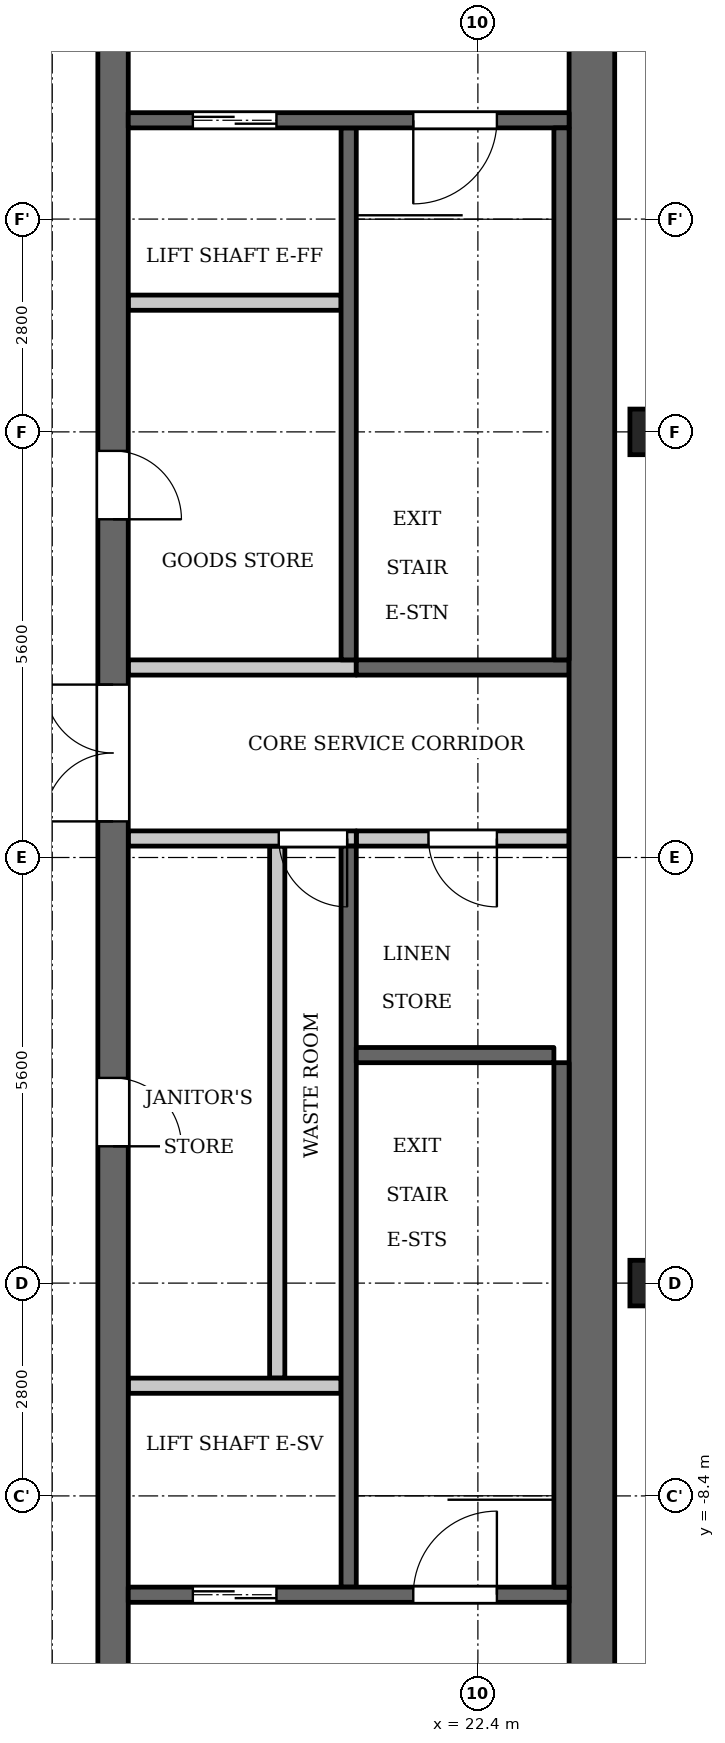
"""IFC4 building model, lengths in metres.
Left out: names, types, materials, properties, quantities, classifications, styles, units other than length and angle.
Written with IfcOpenShell. Run it as: python <this file> out.ifc"""

import sys

from ifc_helpers import new_model, si_unit, direction, frame, frame_2d, origin, origin_2d, place, context, subcontext, project, spatial, polyline, rectangle, outline, extrude, element, fill, save


model = new_model("IFC4")
c1 = context("Model", 3, precision=1e-05, world=origin(), true_north=direction((0.0, 1.0)))
c2 = subcontext(c1, "Body", "Model", "MODEL_VIEW")
j1 = project(units=[si_unit("LENGTHUNIT", "METRE"), si_unit("PLANEANGLEUNIT", "RADIAN")], contexts=[c1])
p1 = place(None, origin())
s1 = spatial("IfcSite", under=j1, at=p1, CompositionType="ELEMENT")
p2 = place(p1, origin())
s2 = spatial("IfcBuilding", under=s1, at=p2, CompositionType="ELEMENT")
p3 = place(p2, frame((0.0, 0.0, 313.9)))
s3 = spatial("IfcBuildingStorey", under=s2, at=p3, CompositionType="ELEMENT", Elevation=313.9)
for number, where, z_axis, x_axis in (
    (1, (24.7, -5.6, 0.0), (0.0, 0.0, 1.0), (1.0, 0.0, 0.0)),
    (2, (24.7, 5.6, 0.0), (0.0, 0.0, 1.0), (1.0, 0.0, 0.0)),
):
    element("IfcColumn", number, at=place(p3, frame(where, z_axis=z_axis, x_axis=x_axis)), inside=s3, PredefinedType="COLUMN", context=c2, shape_type="SweptSolid", body=[
        extrude(rectangle(XDim=0.6, YDim=0.6, at=origin_2d()), origin(), (0.0, 0.0, 1.0), 3.5),
    ])
p4 = place(p3, frame((0.0, 0.0, 3.5)))
e3 = element("IfcWall", 3, at=p4, inside=s3, PredefinedType="PARAPET", context=c2, shape_type="SweptSolid", body=[
    extrude(outline(polyline([(15.0, 19.6), (15.0, -19.6), (17.2, -19.6), (19.424, -19.176), (21.297, -17.903), (23.503, -15.697), (24.776, -13.824), (25.2, -11.6), (25.2, 11.6), (24.776, 13.824), (23.503, 15.697), (21.297, 17.903), (19.424, 19.176), (17.2, 19.6), (15.0, 19.6)]), holes=[polyline([(17.172, -19.3), (15.3, -19.3), (15.3, 19.3), (17.172, 19.3), (19.307, 18.893), (21.105, 17.671), (23.271, 15.505), (24.493, 13.707), (24.9, 11.572), (24.9, -11.572), (24.493, -13.707), (23.271, -15.505), (21.105, -17.671), (19.307, -18.893), (17.172, -19.3)])]), origin(), (0.0, 0.0, 1.0), 1.5),
])
p5 = place(p3, frame((20.7, 2.6, 0.0), z_axis=(0.0, 0.0, 1.0), x_axis=(0.0, 1.0, 0.0)))
e4 = element("IfcWall", 4, at=p5, inside=s3, PredefinedType="SHEAR", context=c2, shape_type="SweptSolid", body=[
    extrude(rectangle(XDim=7.0, YDim=0.2, at=frame_2d((3.5, 0.0))), origin(), (0.0, 0.0, 1.0), 3.2),
])
p6 = place(p3, frame((20.7, -9.6, 0.0), z_axis=(0.0, 0.0, 1.0), x_axis=(0.0, 1.0, 0.0)))
e5 = element("IfcWall", 5, at=p6, inside=s3, PredefinedType="SHEAR", context=c2, shape_type="SweptSolid", body=[
    extrude(rectangle(XDim=9.75, YDim=0.2, at=frame_2d((4.875, 0.0))), origin(), (0.0, 0.0, 1.0), 3.2),
])
p7 = place(p3, frame((20.8, 2.5, 0.0), z_axis=(0.0, 0.0, 1.0), x_axis=(1.0, 0.0, 0.0)))
e6 = element("IfcWall", 6, at=p7, inside=s3, PredefinedType="SHEAR", context=c2, shape_type="SweptSolid", body=[
    extrude(rectangle(XDim=2.8, YDim=0.2, at=frame_2d((1.4, 0.0))), origin(), (0.0, 0.0, 1.0), 3.2),
])
p8 = place(p3, frame((20.8, 0.25, 0.0), z_axis=(0.0, 0.0, 1.0), x_axis=(1.0, 0.0, 0.0)))
e7 = element("IfcWall", 7, at=p8, inside=s3, PredefinedType="PARTITIONING", context=c2, shape_type="SweptSolid", body=[
    extrude(rectangle(XDim=2.8, YDim=0.2, at=frame_2d((1.4, 0.0))), origin(), (0.0, 0.0, 1.0), 3.2),
])
p9 = place(p8, frame((0.95, 0.0, 0.0)))
e8 = element("IfcOpeningElement", 8, at=p9, cuts=e7, PredefinedType="OPENING", context=c2, shape_type="SweptSolid", body=[
    extrude(rectangle(XDim=0.9, YDim=2.1, at=frame_2d((0.45, 1.05))), frame((0.0, 0.11, 0.0), z_axis=(0.0, -1.0, 0.0), x_axis=(1.0, 0.0, 0.0)), (0.0, 0.0, 1.0), 0.22),
])
p10 = place(p3, frame((19.76, -6.85, 0.0), z_axis=(0.0, 0.0, 1.0), x_axis=(0.0, 1.0, 0.0)))
e9 = element("IfcWall", 9, at=p10, inside=s3, PredefinedType="PARTITIONING", context=c2, shape_type="SweptSolid", body=[
    extrude(rectangle(XDim=7.0, YDim=0.2, at=frame_2d((3.5, 0.0))), origin(), (0.0, 0.0, 1.0), 3.2),
])
p11 = place(p3, frame((17.6, -12.6, 0.0), z_axis=(0.0, 0.0, 1.0), x_axis=(0.0, 1.0, 0.0)))
e10 = element("IfcWall", 10, at=p11, inside=s3, PredefinedType="SHEAR", context=c2, shape_type="SweptSolid", body=[
    extrude(rectangle(XDim=25.2, YDim=0.4, at=frame_2d((12.6, 0.0))), origin(), (0.0, 0.0, 1.0), 3.2),
])
p12 = place(p11, frame((8.8, 0.0, 0.0)))
e11 = element("IfcOpeningElement", 11, at=p12, cuts=e10, PredefinedType="OPENING", context=c2, shape_type="SweptSolid", body=[
    extrude(rectangle(XDim=0.9, YDim=2.1, at=frame_2d((0.45, 1.05))), frame((0.0, 0.21, 0.0), z_axis=(0.0, -1.0, 0.0), x_axis=(1.0, 0.0, 0.0)), (0.0, 0.0, 1.0), 0.42),
])
p13 = place(p11, frame((17.05, 0.0, 0.0)))
e12 = element("IfcOpeningElement", 12, at=p13, cuts=e10, PredefinedType="OPENING", context=c2, shape_type="SweptSolid", body=[
    extrude(rectangle(XDim=0.9, YDim=2.1, at=frame_2d((0.45, 1.05))), frame((0.0, 0.21, 0.0), z_axis=(0.0, -1.0, 0.0), x_axis=(1.0, 0.0, 0.0)), (0.0, 0.0, 1.0), 0.42),
])
p14 = place(p11, frame((23.25, 0.0, 0.0)))
e13 = element("IfcOpeningElement", 13, at=p14, cuts=e10, PredefinedType="OPENING", context=c2, shape_type="SweptSolid", body=[
    extrude(rectangle(XDim=1.1, YDim=2.1, at=frame_2d((0.55, 1.05))), frame((0.0, 0.21, 0.0), z_axis=(0.0, -1.0, 0.0), x_axis=(1.0, 0.0, 0.0)), (0.0, 0.0, 1.0), 0.42),
])
p15 = place(p11, frame((0.85, 0.0, 0.0)))
e14 = element("IfcOpeningElement", 14, at=p15, cuts=e10, PredefinedType="OPENING", context=c2, shape_type="SweptSolid", body=[
    extrude(rectangle(XDim=1.1, YDim=2.1, at=frame_2d((0.55, 1.05))), frame((0.0, 0.21, 0.0), z_axis=(0.0, -1.0, 0.0), x_axis=(1.0, 0.0, 0.0)), (0.0, 0.0, 1.0), 0.42),
])
p16 = place(p11, frame((13.075, 0.0, 0.0)))
e15 = element("IfcOpeningElement", 15, at=p16, cuts=e10, PredefinedType="OPENING", context=c2, shape_type="SweptSolid", body=[
    extrude(rectangle(XDim=1.8, YDim=2.1, at=frame_2d((0.9, 1.05))), frame((0.0, 0.21, 0.0), z_axis=(0.0, -1.0, 0.0), x_axis=(1.0, 0.0, 0.0)), (0.0, 0.0, 1.0), 0.42),
])
p17 = place(p3, frame((23.9, -12.6, 0.0), z_axis=(0.0, 0.0, 1.0), x_axis=(0.0, 1.0, 0.0)))
e16 = element("IfcWall", 16, at=p17, inside=s3, PredefinedType="SHEAR", context=c2, shape_type="SweptSolid", body=[
    extrude(rectangle(XDim=25.2, YDim=0.6, at=frame_2d((12.6, 0.0))), origin(), (0.0, 0.0, 1.0), 3.2),
])
p18 = place(p3, frame((17.8, -9.7, 0.0), z_axis=(0.0, 0.0, 1.0), x_axis=(1.0, 0.0, 0.0)))
e17 = element("IfcWall", 17, at=p18, inside=s3, PredefinedType="SHEAR", context=c2, shape_type="SweptSolid", body=[
    extrude(rectangle(XDim=5.8, YDim=0.2, at=frame_2d((2.9, 0.0))), origin(), (0.0, 0.0, 1.0), 3.2),
])
p19 = place(p18, frame((0.85, 0.0, 0.0)))
e18 = element("IfcOpeningElement", 18, at=p19, cuts=e17, PredefinedType="OPENING", context=c2, shape_type="SweptSolid", body=[
    extrude(rectangle(XDim=1.1, YDim=2.1, at=frame_2d((0.55, 1.05))), frame((0.0, 0.11, 0.0), z_axis=(0.0, -1.0, 0.0), x_axis=(1.0, 0.0, 0.0)), (0.0, 0.0, 1.0), 0.22),
])
p20 = place(p18, frame((3.75, 0.0, 0.0)))
e19 = element("IfcOpeningElement", 19, at=p20, cuts=e17, PredefinedType="OPENING", context=c2, shape_type="SweptSolid", body=[
    extrude(rectangle(XDim=1.1, YDim=2.1, at=frame_2d((0.55, 1.05))), frame((0.0, 0.11, 0.0), z_axis=(0.0, -1.0, 0.0), x_axis=(1.0, 0.0, 0.0)), (0.0, 0.0, 1.0), 0.22),
])
p21 = place(p3, frame((17.8, -6.95, 0.0), z_axis=(0.0, 0.0, 1.0), x_axis=(1.0, 0.0, 0.0)))
e20 = element("IfcWall", 20, at=p21, inside=s3, PredefinedType="PARTITIONING", context=c2, shape_type="SweptSolid", body=[
    extrude(rectangle(XDim=2.8, YDim=0.2, at=frame_2d((1.4, 0.0))), origin(), (0.0, 0.0, 1.0), 3.2),
])
p22 = place(p3, frame((17.8, 0.25, 0.0), z_axis=(0.0, 0.0, 1.0), x_axis=(1.0, 0.0, 0.0)))
e21 = element("IfcWall", 21, at=p22, inside=s3, PredefinedType="PARTITIONING", context=c2, shape_type="SweptSolid", body=[
    extrude(rectangle(XDim=3.0, YDim=0.2, at=frame_2d((1.5, 0.0))), origin(), (0.0, 0.0, 1.0), 3.2),
])
p23 = place(p22, frame((1.98, 0.0, 0.0)))
e22 = element("IfcOpeningElement", 22, at=p23, cuts=e21, PredefinedType="OPENING", context=c2, shape_type="SweptSolid", body=[
    extrude(rectangle(XDim=0.9, YDim=2.1, at=frame_2d((0.45, 1.05))), frame((0.0, 0.11, 0.0), z_axis=(0.0, -1.0, 0.0), x_axis=(1.0, 0.0, 0.0)), (0.0, 0.0, 1.0), 0.22),
])
p24 = place(p3, frame((17.8, 2.5, 0.0), z_axis=(0.0, 0.0, 1.0), x_axis=(1.0, 0.0, 0.0)))
e23 = element("IfcWall", 23, at=p24, inside=s3, PredefinedType="PARTITIONING", context=c2, shape_type="SweptSolid", body=[
    extrude(rectangle(XDim=3.0, YDim=0.2, at=frame_2d((1.5, 0.0))), origin(), (0.0, 0.0, 1.0), 3.2),
])
p25 = place(p3, frame((17.8, 7.3, 0.0), z_axis=(0.0, 0.0, 1.0), x_axis=(1.0, 0.0, 0.0)))
e24 = element("IfcWall", 24, at=p25, inside=s3, PredefinedType="PARTITIONING", context=c2, shape_type="SweptSolid", body=[
    extrude(rectangle(XDim=2.8, YDim=0.2, at=frame_2d((1.4, 0.0))), origin(), (0.0, 0.0, 1.0), 3.2),
])
p26 = place(p3, frame((17.8, 9.7, 0.0), z_axis=(0.0, 0.0, 1.0), x_axis=(1.0, 0.0, 0.0)))
e25 = element("IfcWall", 25, at=p26, inside=s3, PredefinedType="SHEAR", context=c2, shape_type="SweptSolid", body=[
    extrude(rectangle(XDim=5.8, YDim=0.2, at=frame_2d((2.9, 0.0))), origin(), (0.0, 0.0, 1.0), 3.2),
])
p27 = place(p26, frame((0.85, 0.0, 0.0)))
e26 = element("IfcOpeningElement", 26, at=p27, cuts=e25, PredefinedType="OPENING", context=c2, shape_type="SweptSolid", body=[
    extrude(rectangle(XDim=1.1, YDim=2.1, at=frame_2d((0.55, 1.05))), frame((0.0, 0.11, 0.0), z_axis=(0.0, -1.0, 0.0), x_axis=(1.0, 0.0, 0.0)), (0.0, 0.0, 1.0), 0.22),
])
p28 = place(p26, frame((3.75, 0.0, 0.0)))
e27 = element("IfcOpeningElement", 27, at=p28, cuts=e25, PredefinedType="OPENING", context=c2, shape_type="SweptSolid", body=[
    extrude(rectangle(XDim=1.1, YDim=2.1, at=frame_2d((0.55, 1.05))), frame((0.0, 0.11, 0.0), z_axis=(0.0, -1.0, 0.0), x_axis=(1.0, 0.0, 0.0)), (0.0, 0.0, 1.0), 0.22),
])
p29 = place(p3, frame((23.5, 2.6, 0.0), z_axis=(0.0, 0.0, 1.0), x_axis=(0.0, 1.0, 0.0)))
e28 = element("IfcWall", 28, at=p29, inside=s3, PredefinedType="SHEAR", context=c2, shape_type="SweptSolid", body=[
    extrude(rectangle(XDim=7.0, YDim=0.2, at=frame_2d((3.5, 0.0))), origin(), (0.0, 0.0, 1.0), 3.2),
])
p30 = place(p3, frame((23.5, -9.6, 0.0), z_axis=(0.0, 0.0, 1.0), x_axis=(0.0, 1.0, 0.0)))
e29 = element("IfcWall", 29, at=p30, inside=s3, PredefinedType="SHEAR", context=c2, shape_type="SweptSolid", body=[
    extrude(rectangle(XDim=6.9, YDim=0.2, at=frame_2d((3.45, 0.0))), origin(), (0.0, 0.0, 1.0), 3.2),
])
p31 = place(p3, frame((20.8, -2.6, 0.0), z_axis=(0.0, 0.0, 1.0), x_axis=(1.0, 0.0, 0.0)))
e30 = element("IfcWall", 30, at=p31, inside=s3, PredefinedType="SHEAR", context=c2, shape_type="SweptSolid", body=[
    extrude(rectangle(XDim=2.6, YDim=0.2, at=frame_2d((1.3, 0.0))), origin(), (0.0, 0.0, 1.0), 3.2),
])
p32 = place(p19, origin())
e31 = element("IfcDoor", 31, at=p32, inside=s3, OperationType="DOUBLE_DOOR_SLIDING", PredefinedType="DOOR", context=c2, shape_type="SweptSolid", body=[
    extrude(rectangle(XDim=1.1, YDim=2.1, at=frame_2d((0.55, 1.05))), frame((0.0, 0.025, 0.0), z_axis=(0.0, -1.0, 0.0), x_axis=(1.0, 0.0, 0.0)), (0.0, 0.0, 1.0), 0.05),
])
fill(e18, e31)
p33 = place(p12, origin())
e32 = element("IfcDoor", 32, at=p33, inside=s3, OperationType="SINGLE_SWING_LEFT", PredefinedType="DOOR", context=c2, shape_type="SweptSolid", body=[
    extrude(rectangle(XDim=0.9, YDim=2.1, at=frame_2d((0.45, 1.05))), frame((0.0, 0.025, 0.0), z_axis=(0.0, -1.0, 0.0), x_axis=(1.0, 0.0, 0.0)), (0.0, 0.0, 1.0), 0.05),
])
fill(e11, e32)
p34 = place(p23, origin())
e33 = element("IfcDoor", 33, at=p34, inside=s3, OperationType="SINGLE_SWING_RIGHT", PredefinedType="DOOR", context=c2, shape_type="SweptSolid", body=[
    extrude(rectangle(XDim=0.9, YDim=2.1, at=frame_2d((0.45, 1.05))), frame((0.0, 0.025, 0.0), z_axis=(0.0, -1.0, 0.0), x_axis=(1.0, 0.0, 0.0)), (0.0, 0.0, 1.0), 0.05),
])
fill(e22, e33)
p35 = place(p13, origin())
e34 = element("IfcDoor", 34, at=p35, inside=s3, OperationType="SINGLE_SWING_LEFT", PredefinedType="DOOR", context=c2, shape_type="SweptSolid", body=[
    extrude(rectangle(XDim=0.9, YDim=2.1, at=frame_2d((0.45, 1.05))), frame((0.0, 0.025, 0.0), z_axis=(0.0, -1.0, 0.0), x_axis=(1.0, 0.0, 0.0)), (0.0, 0.0, 1.0), 0.05),
])
fill(e12, e34)
p36 = place(p27, origin())
e35 = element("IfcDoor", 35, at=p36, inside=s3, OperationType="DOUBLE_DOOR_SLIDING", PredefinedType="DOOR", context=c2, shape_type="SweptSolid", body=[
    extrude(rectangle(XDim=1.1, YDim=2.1, at=frame_2d((0.55, 1.05))), frame((0.0, 0.025, 0.0), z_axis=(0.0, -1.0, 0.0), x_axis=(1.0, 0.0, 0.0)), (0.0, 0.0, 1.0), 0.05),
])
fill(e26, e35)
p37 = place(p28, origin())
e36 = element("IfcDoor", 36, at=p37, inside=s3, OperationType="SINGLE_SWING_LEFT", PredefinedType="DOOR", context=c2, shape_type="SweptSolid", body=[
    extrude(rectangle(XDim=1.1, YDim=2.1, at=frame_2d((0.55, 1.05))), frame((0.0, 0.025, 0.0), z_axis=(0.0, -1.0, 0.0), x_axis=(1.0, 0.0, 0.0)), (0.0, 0.0, 1.0), 0.05),
])
fill(e27, e36)
p38 = place(p20, origin())
e37 = element("IfcDoor", 37, at=p38, inside=s3, OperationType="SINGLE_SWING_LEFT", PredefinedType="DOOR", context=c2, shape_type="SweptSolid", body=[
    extrude(rectangle(XDim=1.1, YDim=2.1, at=frame_2d((0.55, 1.05))), frame((0.0, 0.025, 0.0), z_axis=(0.0, -1.0, 0.0), x_axis=(1.0, 0.0, 0.0)), (0.0, 0.0, 1.0), 0.05),
])
fill(e19, e37)
p39 = place(p16, origin())
e38 = element("IfcDoor", 38, at=p39, inside=s3, OperationType="DOUBLE_DOOR_SINGLE_SWING", PredefinedType="DOOR", context=c2, shape_type="SweptSolid", body=[
    extrude(rectangle(XDim=1.8, YDim=2.1, at=frame_2d((0.9, 1.05))), frame((0.0, 0.025, 0.0), z_axis=(0.0, -1.0, 0.0), x_axis=(1.0, 0.0, 0.0)), (0.0, 0.0, 1.0), 0.05),
])
fill(e15, e38)
p40 = place(p9, origin())
e39 = element("IfcDoor", 39, at=p40, inside=s3, OperationType="SINGLE_SWING_RIGHT", PredefinedType="DOOR", context=c2, shape_type="SweptSolid", body=[
    extrude(rectangle(XDim=0.9, YDim=2.1, at=frame_2d((0.45, 1.05))), frame((0.0, 0.025, 0.0), z_axis=(0.0, -1.0, 0.0), x_axis=(1.0, 0.0, 0.0)), (0.0, 0.0, 1.0), 0.05),
])
fill(e8, e39)
save(model, sys.argv[1])
